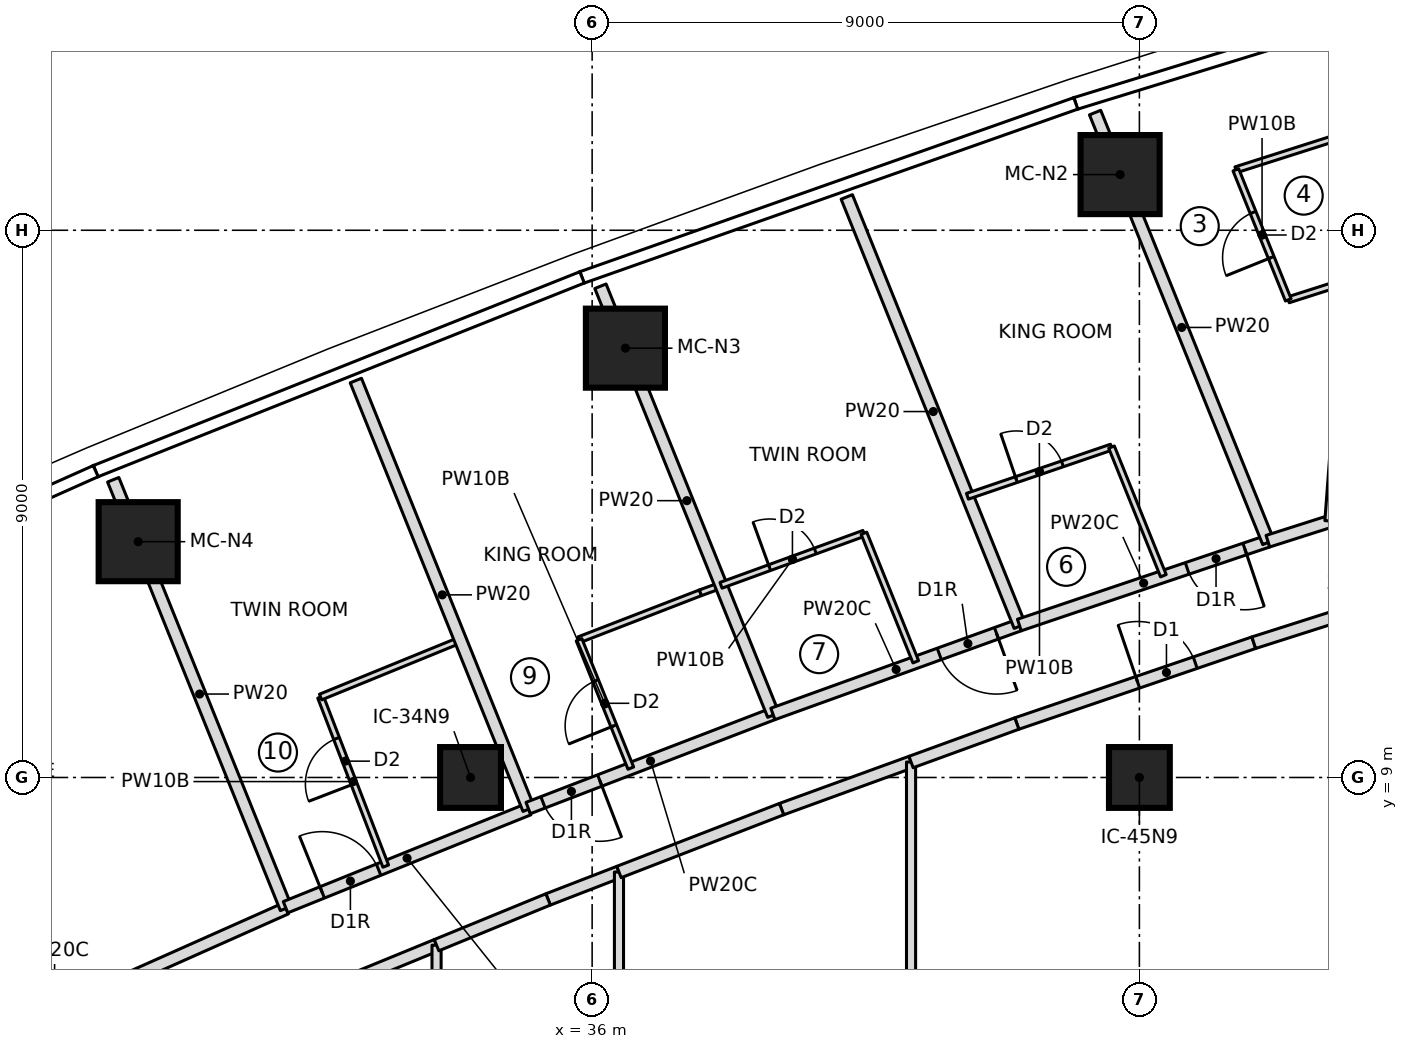
"""IFC4 building model, lengths in metres.
Left out: names, types, materials, properties, quantities, classifications, styles, units other than length and angle.
Written with IfcOpenShell. Run it as: python <this file> out.ifc"""

import sys

from ifc_helpers import new_model, si_unit, direction, frame, frame_2d, origin, origin_2d, place, context, subcontext, project, spatial, rectangle, extrude, element, fill, save


model = new_model("IFC4")
c1 = context("Model", 3, precision=1e-05, world=origin(), true_north=direction((0.0, 1.0)))
c2 = subcontext(c1, "Body", "Model", "MODEL_VIEW")
j1 = project(units=[si_unit("LENGTHUNIT", "METRE"), si_unit("PLANEANGLEUNIT", "RADIAN")], contexts=[c1])
p1 = place(None, origin())
s1 = spatial("IfcSite", under=j1, at=p1, CompositionType="ELEMENT")
p2 = place(p1, origin())
s2 = spatial("IfcBuilding", under=s1, at=p2, CompositionType="ELEMENT")
p3 = place(p2, frame((0.0, 0.0, 207.45)))
s3 = spatial("IfcBuildingStorey", under=s2, at=p3, CompositionType="ELEMENT", Elevation=207.45)
for number, where, z_axis, x_axis in (
    (1, (44.683, 18.916, 0.0), (0.0, 0.0, 1.0), (1.0, 0.0, 0.0)),
    (2, (36.547, 16.061, 0.0), (0.0, 0.0, 1.0), (1.0, 0.0, 0.0)),
    (3, (28.534, 12.878, 0.0), (0.0, 0.0, 1.0), (1.0, 0.0, 0.0)),
):
    element("IfcColumn", number, at=place(p3, frame(where, z_axis=z_axis, x_axis=x_axis)), inside=s3, PredefinedType="COLUMN", context=c2, shape_type="SweptSolid", body=[
        extrude(rectangle(XDim=1.3, YDim=1.3, at=origin_2d()), origin(), (0.0, 0.0, 1.0), 3.55),
    ])
for number, where, z_axis, x_axis in (
    (4, (34.0, 9.0, 0.0), (0.0, 0.0, 1.0), (1.0, 0.0, 0.0)),
    (5, (45.0, 9.0, 0.0), (0.0, 0.0, 1.0), (1.0, 0.0, 0.0)),
):
    element("IfcColumn", number, at=place(p3, frame(where, z_axis=z_axis, x_axis=x_axis)), inside=s3, PredefinedType="COLUMN", context=c2, shape_type="SweptSolid", body=[
        extrude(rectangle(XDim=1.0, YDim=1.0, at=origin_2d()), origin(), (0.0, 0.0, 1.0), 3.55),
    ])
p4 = place(p3, frame((23.354, 3.458, 0.0), z_axis=(0.0, 0.0, 1.0), x_axis=(0.913485016927, 0.406872368009, 0.0)))
e6 = element("IfcWall", 6, at=p4, inside=s3, PredefinedType="PARTITIONING", context=c2, shape_type="SweptSolid", body=[
    extrude(rectangle(XDim=8.332, YDim=0.2, at=frame_2d((4.166, 0.0))), origin(), (0.0, 0.0, 1.0), 3.15),
])
p5 = place(p4, frame((3.05, 0.0, 0.0)))
e7 = element("IfcOpeningElement", 7, at=p5, cuts=e6, PredefinedType="OPENING", context=c2, shape_type="SweptSolid", body=[
    extrude(rectangle(XDim=1.0, YDim=2.1, at=frame_2d((0.5, 1.05))), frame((0.0, 0.11, 0.0), z_axis=(0.0, -1.0, 0.0), x_axis=(1.0, 0.0, 0.0)), (0.0, 0.0, 1.0), 0.22),
])
p6 = place(p3, frame((30.965, 6.848, 0.0), z_axis=(0.0, 0.0, 1.0), x_axis=(-0.373876084216, 0.927478664796, 0.0)))
e8 = element("IfcWall", 8, at=p6, inside=s3, PredefinedType="PARTITIONING", context=c2, shape_type="SweptSolid", body=[
    extrude(rectangle(XDim=7.6, YDim=0.2, at=frame_2d((3.8, 0.0))), origin(), (0.0, 0.0, 1.0), 3.15),
])
p7 = place(p3, frame((30.958, 6.866, 0.0), z_axis=(0.0, 0.0, 1.0), x_axis=(0.927398695046, 0.374074404933, 0.0)))
e9 = element("IfcWall", 9, at=p7, inside=s3, PredefinedType="PARTITIONING", context=c2, shape_type="SweptSolid", body=[
    extrude(rectangle(XDim=4.311, YDim=0.2, at=frame_2d((2.155, 0.0))), origin(), (0.0, 0.0, 1.0), 3.15),
])
p8 = place(p7, frame((0.65, 0.0, 0.0)))
e10 = element("IfcOpeningElement", 10, at=p8, cuts=e9, PredefinedType="OPENING", context=c2, shape_type="SweptSolid", body=[
    extrude(rectangle(XDim=1.0, YDim=2.1, at=frame_2d((0.5, 1.05))), frame((0.0, 0.11, 0.0), z_axis=(0.0, -1.0, 0.0), x_axis=(1.0, 0.0, 0.0)), (0.0, 0.0, 1.0), 0.22),
])
p9 = place(p3, frame((32.605, 7.542, 0.0), z_axis=(0.0, 0.0, 1.0), x_axis=(-0.359637744424, 0.933092006603, 0.0)))
e11 = element("IfcWall", 11, at=p9, inside=s3, PredefinedType="PARTITIONING", context=c2, shape_type="SweptSolid", body=[
    extrude(rectangle(XDim=2.98, YDim=0.1, at=frame_2d((1.49, 0.0))), origin(), (0.0, 0.0, 1.0), 3.15),
])
p10 = place(p9, frame((1.45, 0.0, 0.0)))
e12 = element("IfcOpeningElement", 12, at=p10, cuts=e11, PredefinedType="OPENING", context=c2, shape_type="SweptSolid", body=[
    extrude(rectangle(XDim=0.8, YDim=2.1, at=frame_2d((0.4, 1.05))), frame((0.0, 0.06, 0.0), z_axis=(0.0, -1.0, 0.0), x_axis=(1.0, 0.0, 0.0)), (0.0, 0.0, 1.0), 0.12),
])
p11 = place(p3, frame((31.534, 10.323, 0.0), z_axis=(0.0, 0.0, 1.0), x_axis=(0.925906573805, 0.377752586469, 0.0)))
e13 = element("IfcWall", 13, at=p11, inside=s3, PredefinedType="PARTITIONING", context=c2, shape_type="SweptSolid", body=[
    extrude(rectangle(XDim=2.484, YDim=0.1, at=frame_2d((1.242, 0.0))), origin(), (0.0, 0.0, 1.0), 3.15),
])
p12 = place(p3, frame((34.956, 8.479, 0.0), z_axis=(0.0, 0.0, 1.0), x_axis=(-0.373881438439, 0.927476506436, 0.0)))
e14 = element("IfcWall", 14, at=p12, inside=s3, PredefinedType="PARTITIONING", context=c2, shape_type="SweptSolid", body=[
    extrude(rectangle(XDim=7.601, YDim=0.2, at=frame_2d((3.8, 0.0))), origin(), (0.0, 0.0, 1.0), 3.15),
])
p13 = place(p3, frame((38.972, 10.045, 0.0), z_axis=(0.0, 0.0, 1.0), x_axis=(-0.93335728106, -0.358948723208, 0.0)))
e15 = element("IfcWall", 15, at=p13, inside=s3, PredefinedType="PARTITIONING", context=c2, shape_type="SweptSolid", body=[
    extrude(rectangle(XDim=4.312, YDim=0.2, at=frame_2d((2.156, 0.0))), origin(), (0.0, 0.0, 1.0), 3.15),
])
p14 = place(p13, frame((3.05, 0.0, 0.0)))
e16 = element("IfcOpeningElement", 16, at=p14, cuts=e15, PredefinedType="OPENING", context=c2, shape_type="SweptSolid", body=[
    extrude(rectangle(XDim=1.0, YDim=2.1, at=frame_2d((0.5, 1.05))), frame((0.0, 0.11, 0.0), z_axis=(0.0, -1.0, 0.0), x_axis=(1.0, 0.0, 0.0)), (0.0, 0.0, 1.0), 0.22),
])
p15 = place(p3, frame((35.785, 11.266, 0.0), z_axis=(0.0, 0.0, 1.0), x_axis=(0.932673396793, 0.360721963448, 0.0)))
e17 = element("IfcWall", 17, at=p15, inside=s3, PredefinedType="PARTITIONING", context=c2, shape_type="SweptSolid", body=[
    extrude(rectangle(XDim=2.139, YDim=0.1, at=frame_2d((1.07, 0.0))), origin(), (0.0, 0.0, 1.0), 3.15),
])
p16 = place(p3, frame((37.78, 12.037, 0.0), z_axis=(0.0, 0.0, 1.0), x_axis=(0.939595761479, 0.34228614493, 0.0)))
e18 = element("IfcWall", 18, at=p16, inside=s3, PredefinedType="PARTITIONING", context=c2, shape_type="SweptSolid", body=[
    extrude(rectangle(XDim=0.361, YDim=0.1, at=frame_2d((0.18, 0.0))), origin(), (0.0, 0.0, 1.0), 3.15),
])
p17 = place(p3, frame((36.636, 9.154, 0.0), z_axis=(0.0, 0.0, 1.0), x_axis=(-0.373885031976, 0.927475057813, 0.0)))
e19 = element("IfcWall", 19, at=p17, inside=s3, PredefinedType="PARTITIONING", context=c2, shape_type="SweptSolid", body=[
    extrude(rectangle(XDim=2.277, YDim=0.1, at=frame_2d((1.138, 0.0))), origin(), (0.0, 0.0, 1.0), 3.15),
])
p18 = place(p17, frame((0.75, 0.0, 0.0)))
e20 = element("IfcOpeningElement", 20, at=p18, cuts=e19, PredefinedType="OPENING", context=c2, shape_type="SweptSolid", body=[
    extrude(rectangle(XDim=0.8, YDim=2.1, at=frame_2d((0.4, 1.05))), frame((0.0, 0.06, 0.0), z_axis=(0.0, -1.0, 0.0), x_axis=(1.0, 0.0, 0.0)), (0.0, 0.0, 1.0), 0.12),
])
p19 = place(p3, frame((38.98, 10.026, 0.0), z_axis=(0.0, 0.0, 1.0), x_axis=(-0.373863662938, 0.927483671843, 0.0)))
e21 = element("IfcWall", 21, at=p19, inside=s3, PredefinedType="PARTITIONING", context=c2, shape_type="SweptSolid", body=[
    extrude(rectangle(XDim=7.604, YDim=0.2, at=frame_2d((3.802, 0.0))), origin(), (0.0, 0.0, 1.0), 3.15),
])
p20 = place(p3, frame((43.026, 11.507, 0.0), z_axis=(0.0, 0.0, 1.0), x_axis=(-0.940653905433, -0.339367397069, 0.0)))
e22 = element("IfcWall", 22, at=p20, inside=s3, PredefinedType="PARTITIONING", context=c2, shape_type="SweptSolid", body=[
    extrude(rectangle(XDim=4.309, YDim=0.2, at=frame_2d((2.155, 0.0))), origin(), (0.0, 0.0, 1.0), 3.15),
])
p21 = place(p20, frame((0.4, 0.0, 0.0)))
e23 = element("IfcOpeningElement", 23, at=p21, cuts=e22, PredefinedType="OPENING", context=c2, shape_type="SweptSolid", body=[
    extrude(rectangle(XDim=1.0, YDim=2.1, at=frame_2d((0.5, 1.05))), frame((0.0, 0.11, 0.0), z_axis=(0.0, -1.0, 0.0), x_axis=(1.0, 0.0, 0.0)), (0.0, 0.0, 1.0), 0.22),
])
p22 = place(p3, frame((38.119, 12.161, 0.0), z_axis=(0.0, 0.0, 1.0), x_axis=(0.939744972593, 0.341876273652, 0.0)))
e24 = element("IfcWall", 24, at=p22, inside=s3, PredefinedType="PARTITIONING", context=c2, shape_type="SweptSolid", body=[
    extrude(rectangle(XDim=2.501, YDim=0.1, at=frame_2d((1.251, 0.0))), origin(), (0.0, 0.0, 1.0), 3.15),
])
p23 = place(p22, frame((0.85, 0.0, 0.0)))
e25 = element("IfcOpeningElement", 25, at=p23, cuts=e24, PredefinedType="OPENING", context=c2, shape_type="SweptSolid", body=[
    extrude(rectangle(XDim=0.8, YDim=2.1, at=frame_2d((0.4, 1.05))), frame((0.0, 0.06, 0.0), z_axis=(0.0, -1.0, 0.0), x_axis=(1.0, 0.0, 0.0)), (0.0, 0.0, 1.0), 0.12),
])
p24 = place(p3, frame((40.47, 13.016, 0.0), z_axis=(0.0, 0.0, 1.0), x_axis=(0.373846436826, -0.927490615409, 0.0)))
e26 = element("IfcWall", 26, at=p24, inside=s3, PredefinedType="PARTITIONING", context=c2, shape_type="SweptSolid", body=[
    extrude(rectangle(XDim=2.279, YDim=0.1, at=frame_2d((1.139, 0.0))), origin(), (0.0, 0.0, 1.0), 3.15),
])
p25 = place(p3, frame((43.033, 11.489, 0.0), z_axis=(0.0, 0.0, 1.0), x_axis=(-0.373877998371, 0.927477893178, 0.0)))
e27 = element("IfcWall", 27, at=p25, inside=s3, PredefinedType="PARTITIONING", context=c2, shape_type="SweptSolid", body=[
    extrude(rectangle(XDim=7.611, YDim=0.2, at=frame_2d((3.806, 0.0))), origin(), (0.0, 0.0, 1.0), 3.15),
])
p26 = place(p3, frame((47.113, 12.886, 0.0), z_axis=(0.0, 0.0, 1.0), x_axis=(-0.947550995841, -0.319604615549, 0.0)))
e28 = element("IfcWall", 28, at=p26, inside=s3, PredefinedType="PARTITIONING", context=c2, shape_type="SweptSolid", body=[
    extrude(rectangle(XDim=4.314, YDim=0.2, at=frame_2d((2.157, 0.0))), origin(), (0.0, 0.0, 1.0), 3.15),
])
p27 = place(p26, frame((0.4, 0.0, 0.0)))
e29 = element("IfcOpeningElement", 29, at=p27, cuts=e28, PredefinedType="OPENING", context=c2, shape_type="SweptSolid", body=[
    extrude(rectangle(XDim=1.0, YDim=2.1, at=frame_2d((0.5, 1.05))), frame((0.0, 0.11, 0.0), z_axis=(0.0, -1.0, 0.0), x_axis=(1.0, 0.0, 0.0)), (0.0, 0.0, 1.0), 0.22),
])
p28 = place(p3, frame((42.172, 13.625, 0.0), z_axis=(0.0, 0.0, 1.0), x_axis=(0.946406575113, 0.322977699822, 0.0)))
e30 = element("IfcWall", 30, at=p28, inside=s3, PredefinedType="PARTITIONING", context=c2, shape_type="SweptSolid", body=[
    extrude(rectangle(XDim=2.504, YDim=0.1, at=frame_2d((1.252, 0.0))), origin(), (0.0, 0.0, 1.0), 3.15),
])
p29 = place(p28, frame((0.85, 0.0, 0.0)))
e31 = element("IfcOpeningElement", 31, at=p29, cuts=e30, PredefinedType="OPENING", context=c2, shape_type="SweptSolid", body=[
    extrude(rectangle(XDim=0.8, YDim=2.1, at=frame_2d((0.4, 1.05))), frame((0.0, 0.06, 0.0), z_axis=(0.0, -1.0, 0.0), x_axis=(1.0, 0.0, 0.0)), (0.0, 0.0, 1.0), 0.12),
])
p30 = place(p3, frame((44.542, 14.434, 0.0), z_axis=(0.0, 0.0, 1.0), x_axis=(0.373917841166, -0.927461831052, 0.0)))
e32 = element("IfcWall", 32, at=p30, inside=s3, PredefinedType="PARTITIONING", context=c2, shape_type="SweptSolid", body=[
    extrude(rectangle(XDim=2.281, YDim=0.1, at=frame_2d((1.14, 0.0))), origin(), (0.0, 0.0, 1.0), 3.15),
])
p31 = place(p3, frame((47.121, 12.867, 0.0), z_axis=(0.0, 0.0, 1.0), x_axis=(-0.373907892596, 0.92746584188, 0.0)))
e33 = element("IfcWall", 33, at=p31, inside=s3, PredefinedType="PARTITIONING", context=c2, shape_type="SweptSolid", body=[
    extrude(rectangle(XDim=7.621, YDim=0.2, at=frame_2d((3.811, 0.0))), origin(), (0.0, 0.0, 1.0), 3.15),
])
p32 = place(p3, frame((46.586, 18.994, 0.0), z_axis=(0.0, 0.0, 1.0), x_axis=(0.952696570315, 0.303923090451, 0.0)))
e34 = element("IfcWall", 34, at=p32, inside=s3, PredefinedType="PARTITIONING", context=c2, shape_type="SweptSolid", body=[
    extrude(rectangle(XDim=1.933, YDim=0.1, at=frame_2d((0.966, 0.0))), origin(), (0.0, 0.0, 1.0), 3.15),
])
p33 = place(p3, frame((48.427, 17.167, 0.0), z_axis=(0.0, 0.0, 1.0), x_axis=(-0.952763220029, -0.303714086864, 0.0)))
e35 = element("IfcWall", 35, at=p33, inside=s3, PredefinedType="PARTITIONING", context=c2, shape_type="SweptSolid", body=[
    extrude(rectangle(XDim=1.027, YDim=0.1, at=frame_2d((0.513, 0.0))), origin(), (0.0, 0.0, 1.0), 3.15),
])
p34 = place(p3, frame((47.448, 16.855, 0.0), z_axis=(0.0, 0.0, 1.0), x_axis=(-0.373817051068, 0.927502459474, 0.0)))
e36 = element("IfcWall", 36, at=p34, inside=s3, PredefinedType="PARTITIONING", context=c2, shape_type="SweptSolid", body=[
    extrude(rectangle(XDim=2.306, YDim=0.1, at=frame_2d((1.153, 0.0))), origin(), (0.0, 0.0, 1.0), 3.15),
])
p35 = place(p34, frame((0.75, 0.0, 0.0)))
e37 = element("IfcOpeningElement", 37, at=p35, cuts=e36, PredefinedType="OPENING", context=c2, shape_type="SweptSolid", body=[
    extrude(rectangle(XDim=0.8, YDim=2.1, at=frame_2d((0.4, 1.05))), frame((0.0, 0.06, 0.0), z_axis=(0.0, -1.0, 0.0), x_axis=(1.0, 0.0, 0.0)), (0.0, 0.0, 1.0), 0.12),
])
p36 = place(p3, frame((31.467, 5.432, 0.0), z_axis=(0.0, 0.0, 1.0), x_axis=(0.925231428595, 0.379403220256, 0.0)))
e38 = element("IfcWall", 38, at=p36, inside=s3, PredefinedType="PARTITIONING", context=c2, shape_type="SweptSolid", body=[
    extrude(rectangle(XDim=2.135, YDim=0.2, at=frame_2d((1.067, 0.0))), origin(), (0.0, 0.0, 1.0), 3.15),
])
p37 = place(p3, frame((33.441, -6.242, 0.0), z_axis=(0.0, 0.0, 1.0), x_axis=(0.0, 1.0, 0.0)))
e39 = element("IfcWall", 39, at=p37, inside=s3, PredefinedType="PARTITIONING", context=c2, shape_type="SweptSolid", body=[
    extrude(rectangle(XDim=12.484, YDim=0.15, at=frame_2d((6.242, 0.0))), origin(), (0.0, 0.0, 1.0), 3.15),
])
p38 = place(p3, frame((35.276, 6.994, 0.0), z_axis=(0.0, 0.0, 1.0), x_axis=(0.932724985261, 0.360588549276, 0.0)))
e40 = element("IfcWall", 40, at=p38, inside=s3, PredefinedType="PARTITIONING", context=c2, shape_type="SweptSolid", body=[
    extrude(rectangle(XDim=1.25, YDim=0.2, at=frame_2d((0.625, 0.0))), origin(), (0.0, 0.0, 1.0), 3.15),
])
p39 = place(p3, frame((33.441, 6.242, 0.0), z_axis=(0.0, 0.0, 1.0), x_axis=(0.925179705777, 0.379529329589, 0.0)))
e41 = element("IfcWall", 41, at=p39, inside=s3, PredefinedType="PARTITIONING", context=c2, shape_type="SweptSolid", body=[
    extrude(rectangle(XDim=1.983, YDim=0.2, at=frame_2d((0.991, 0.0))), origin(), (0.0, 0.0, 1.0), 3.15),
])
p40 = place(p3, frame((36.441, -7.445, 0.0), z_axis=(0.0, 0.0, 1.0), x_axis=(0.0, 1.0, 0.0)))
e42 = element("IfcWall", 42, at=p40, inside=s3, PredefinedType="PARTITIONING", context=c2, shape_type="SweptSolid", body=[
    extrude(rectangle(XDim=14.89, YDim=0.15, at=frame_2d((7.445, 0.0))), origin(), (0.0, 0.0, 1.0), 3.15),
])
p41 = place(p3, frame((39.115, 8.479, 0.0), z_axis=(0.0, 0.0, 1.0), x_axis=(0.939746227223, 0.341872824923, 0.0)))
e43 = element("IfcWall", 43, at=p41, inside=s3, PredefinedType="PARTITIONING", context=c2, shape_type="SweptSolid", body=[
    extrude(rectangle(XDim=2.266, YDim=0.2, at=frame_2d((1.133, 0.0))), origin(), (0.0, 0.0, 1.0), 3.15),
])
p42 = place(p3, frame((36.441, 7.445, 0.0), z_axis=(0.0, 0.0, 1.0), x_axis=(0.932650373077, 0.36078148733, 0.0)))
e44 = element("IfcWall", 44, at=p42, inside=s3, PredefinedType="PARTITIONING", context=c2, shape_type="SweptSolid", body=[
    extrude(rectangle(XDim=2.867, YDim=0.2, at=frame_2d((1.434, 0.0))), origin(), (0.0, 0.0, 1.0), 3.15),
])
p43 = place(p3, frame((41.245, -9.254, 0.0), z_axis=(0.0, 0.0, 1.0), x_axis=(0.0, 1.0, 0.0)))
e45 = element("IfcWall", 45, at=p43, inside=s3, PredefinedType="PARTITIONING", context=c2, shape_type="SweptSolid", body=[
    extrude(rectangle(XDim=18.508, YDim=0.15, at=frame_2d((9.254, 0.0))), origin(), (0.0, 0.0, 1.0), 3.15),
])
p44 = place(p3, frame((42.984, 9.887, 0.0), z_axis=(0.0, 0.0, 1.0), x_axis=(0.946436071896, 0.322891253852, 0.0)))
e46 = element("IfcWall", 46, at=p44, inside=s3, PredefinedType="PARTITIONING", context=c2, shape_type="SweptSolid", body=[
    extrude(rectangle(XDim=4.117, YDim=0.2, at=frame_2d((2.059, 0.0))), origin(), (0.0, 0.0, 1.0), 3.15),
])
p45 = place(p44, frame((2.1, 0.0, 0.0)))
e47 = element("IfcOpeningElement", 47, at=p45, cuts=e46, PredefinedType="OPENING", context=c2, shape_type="SweptSolid", body=[
    extrude(rectangle(XDim=1.0, YDim=2.1, at=frame_2d((0.5, 1.05))), frame((0.0, 0.11, 0.0), z_axis=(0.0, -1.0, 0.0), x_axis=(1.0, 0.0, 0.0)), (0.0, 0.0, 1.0), 0.22),
])
p46 = place(p3, frame((41.245, 9.254, 0.0), z_axis=(0.0, 0.0, 1.0), x_axis=(0.939704824537, 0.341986611933, 0.0)))
e48 = element("IfcWall", 48, at=p46, inside=s3, PredefinedType="PARTITIONING", context=c2, shape_type="SweptSolid", body=[
    extrude(rectangle(XDim=1.851, YDim=0.2, at=frame_2d((0.926, 0.0))), origin(), (0.0, 0.0, 1.0), 3.15),
])
p47 = place(p3, frame((48.15, 13.217, 0.0), z_axis=(0.0, 0.0, 1.0), x_axis=(-0.952731090451, -0.303814860215, 0.0)))
e49 = element("IfcWall", 49, at=p47, inside=s3, PredefinedType="PARTITIONING", context=c2, shape_type="SweptSolid", body=[
    extrude(rectangle(XDim=1.088, YDim=0.2, at=frame_2d((0.544, 0.0))), origin(), (0.0, 0.0, 1.0), 3.15),
])
p48 = place(p3, frame((46.881, 11.217, 0.0), z_axis=(0.0, 0.0, 1.0), x_axis=(0.952761948983, 0.303718074157, 0.0)))
e50 = element("IfcWall", 50, at=p48, inside=s3, PredefinedType="PARTITIONING", context=c2, shape_type="SweptSolid", body=[
    extrude(rectangle(XDim=1.332, YDim=0.2, at=frame_2d((0.666, 0.0))), origin(), (0.0, 0.0, 1.0), 3.15),
])
p49 = place(p3, frame((48.445, 17.145, 0.0), z_axis=(0.0, 0.0, 1.0), x_axis=(-0.074933243819, -0.997188552366, 0.0)))
e51 = element("IfcWall", 51, at=p49, inside=s3, PredefinedType="PARTITIONING", context=c2, shape_type="SweptSolid", body=[
    extrude(rectangle(XDim=3.939, YDim=0.2, at=frame_2d((1.969, 0.0))), origin(), (0.0, 0.0, 1.0), 3.15),
])
p50 = place(p49, frame((1.47, 0.0, 0.0)))
e52 = element("IfcOpeningElement", 52, at=p50, cuts=e51, PredefinedType="OPENING", context=c2, shape_type="SweptSolid", body=[
    extrude(rectangle(XDim=1.0, YDim=2.1, at=frame_2d((0.5, 1.05))), frame((0.0, 0.11, 0.0), z_axis=(0.0, -1.0, 0.0), x_axis=(1.0, 0.0, 0.0)), (0.0, 0.0, 1.0), 0.22),
])
p51 = place(p10, origin())
e53 = element("IfcDoor", 53, at=p51, inside=s3, OperationType="SINGLE_SWING_LEFT", PredefinedType="DOOR", context=c2, shape_type="SweptSolid", body=[
    extrude(rectangle(XDim=0.8, YDim=2.1, at=frame_2d((0.4, 1.05))), frame((0.0, 0.025, 0.0), z_axis=(0.0, -1.0, 0.0), x_axis=(1.0, 0.0, 0.0)), (0.0, 0.0, 1.0), 0.05),
])
fill(e12, e53)
p52 = place(p8, origin())
e54 = element("IfcDoor", 54, at=p52, inside=s3, OperationType="SINGLE_SWING_RIGHT", PredefinedType="DOOR", context=c2, shape_type="SweptSolid", body=[
    extrude(rectangle(XDim=1.0, YDim=2.1, at=frame_2d((0.5, 1.05))), frame((0.0, 0.025, 0.0), z_axis=(0.0, -1.0, 0.0), x_axis=(1.0, 0.0, 0.0)), (0.0, 0.0, 1.0), 0.05),
])
fill(e10, e54)
p53 = place(p18, origin())
e55 = element("IfcDoor", 55, at=p53, inside=s3, OperationType="SINGLE_SWING_LEFT", PredefinedType="DOOR", context=c2, shape_type="SweptSolid", body=[
    extrude(rectangle(XDim=0.8, YDim=2.1, at=frame_2d((0.4, 1.05))), frame((0.0, 0.025, 0.0), z_axis=(0.0, -1.0, 0.0), x_axis=(1.0, 0.0, 0.0)), (0.0, 0.0, 1.0), 0.05),
])
fill(e20, e55)
p54 = place(p14, origin())
e56 = element("IfcDoor", 56, at=p54, inside=s3, OperationType="SINGLE_SWING_RIGHT", PredefinedType="DOOR", context=c2, shape_type="SweptSolid", body=[
    extrude(rectangle(XDim=1.0, YDim=2.1, at=frame_2d((0.5, 1.05))), frame((0.0, 0.025, 0.0), z_axis=(0.0, -1.0, 0.0), x_axis=(1.0, 0.0, 0.0)), (0.0, 0.0, 1.0), 0.05),
])
fill(e16, e56)
p55 = place(p23, origin())
e57 = element("IfcDoor", 57, at=p55, inside=s3, OperationType="SINGLE_SWING_LEFT", PredefinedType="DOOR", context=c2, shape_type="SweptSolid", body=[
    extrude(rectangle(XDim=0.8, YDim=2.1, at=frame_2d((0.4, 1.05))), frame((0.0, 0.025, 0.0), z_axis=(0.0, -1.0, 0.0), x_axis=(1.0, 0.0, 0.0)), (0.0, 0.0, 1.0), 0.05),
])
fill(e25, e57)
p56 = place(p21, origin())
e58 = element("IfcDoor", 58, at=p56, inside=s3, OperationType="SINGLE_SWING_RIGHT", PredefinedType="DOOR", context=c2, shape_type="SweptSolid", body=[
    extrude(rectangle(XDim=1.0, YDim=2.1, at=frame_2d((0.5, 1.05))), frame((0.0, 0.025, 0.0), z_axis=(0.0, -1.0, 0.0), x_axis=(1.0, 0.0, 0.0)), (0.0, 0.0, 1.0), 0.05),
])
fill(e23, e58)
p57 = place(p29, origin())
e59 = element("IfcDoor", 59, at=p57, inside=s3, OperationType="SINGLE_SWING_LEFT", PredefinedType="DOOR", context=c2, shape_type="SweptSolid", body=[
    extrude(rectangle(XDim=0.8, YDim=2.1, at=frame_2d((0.4, 1.05))), frame((0.0, 0.025, 0.0), z_axis=(0.0, -1.0, 0.0), x_axis=(1.0, 0.0, 0.0)), (0.0, 0.0, 1.0), 0.05),
])
fill(e31, e59)
p58 = place(p27, origin())
e60 = element("IfcDoor", 60, at=p58, inside=s3, OperationType="SINGLE_SWING_RIGHT", PredefinedType="DOOR", context=c2, shape_type="SweptSolid", body=[
    extrude(rectangle(XDim=1.0, YDim=2.1, at=frame_2d((0.5, 1.05))), frame((0.0, 0.025, 0.0), z_axis=(0.0, -1.0, 0.0), x_axis=(1.0, 0.0, 0.0)), (0.0, 0.0, 1.0), 0.05),
])
fill(e29, e60)
p59 = place(p35, origin())
e61 = element("IfcDoor", 61, at=p59, inside=s3, OperationType="SINGLE_SWING_LEFT", PredefinedType="DOOR", context=c2, shape_type="SweptSolid", body=[
    extrude(rectangle(XDim=0.8, YDim=2.1, at=frame_2d((0.4, 1.05))), frame((0.0, 0.025, 0.0), z_axis=(0.0, -1.0, 0.0), x_axis=(1.0, 0.0, 0.0)), (0.0, 0.0, 1.0), 0.05),
])
fill(e37, e61)
p60 = place(p45, origin())
e62 = element("IfcDoor", 62, at=p60, inside=s3, OperationType="SINGLE_SWING_LEFT", PredefinedType="DOOR", context=c2, shape_type="SweptSolid", body=[
    extrude(rectangle(XDim=1.0, YDim=2.1, at=frame_2d((0.5, 1.05))), frame((0.0, 0.025, 0.0), z_axis=(0.0, -1.0, 0.0), x_axis=(1.0, 0.0, 0.0)), (0.0, 0.0, 1.0), 0.05),
])
fill(e47, e62)
save(model, sys.argv[1])
